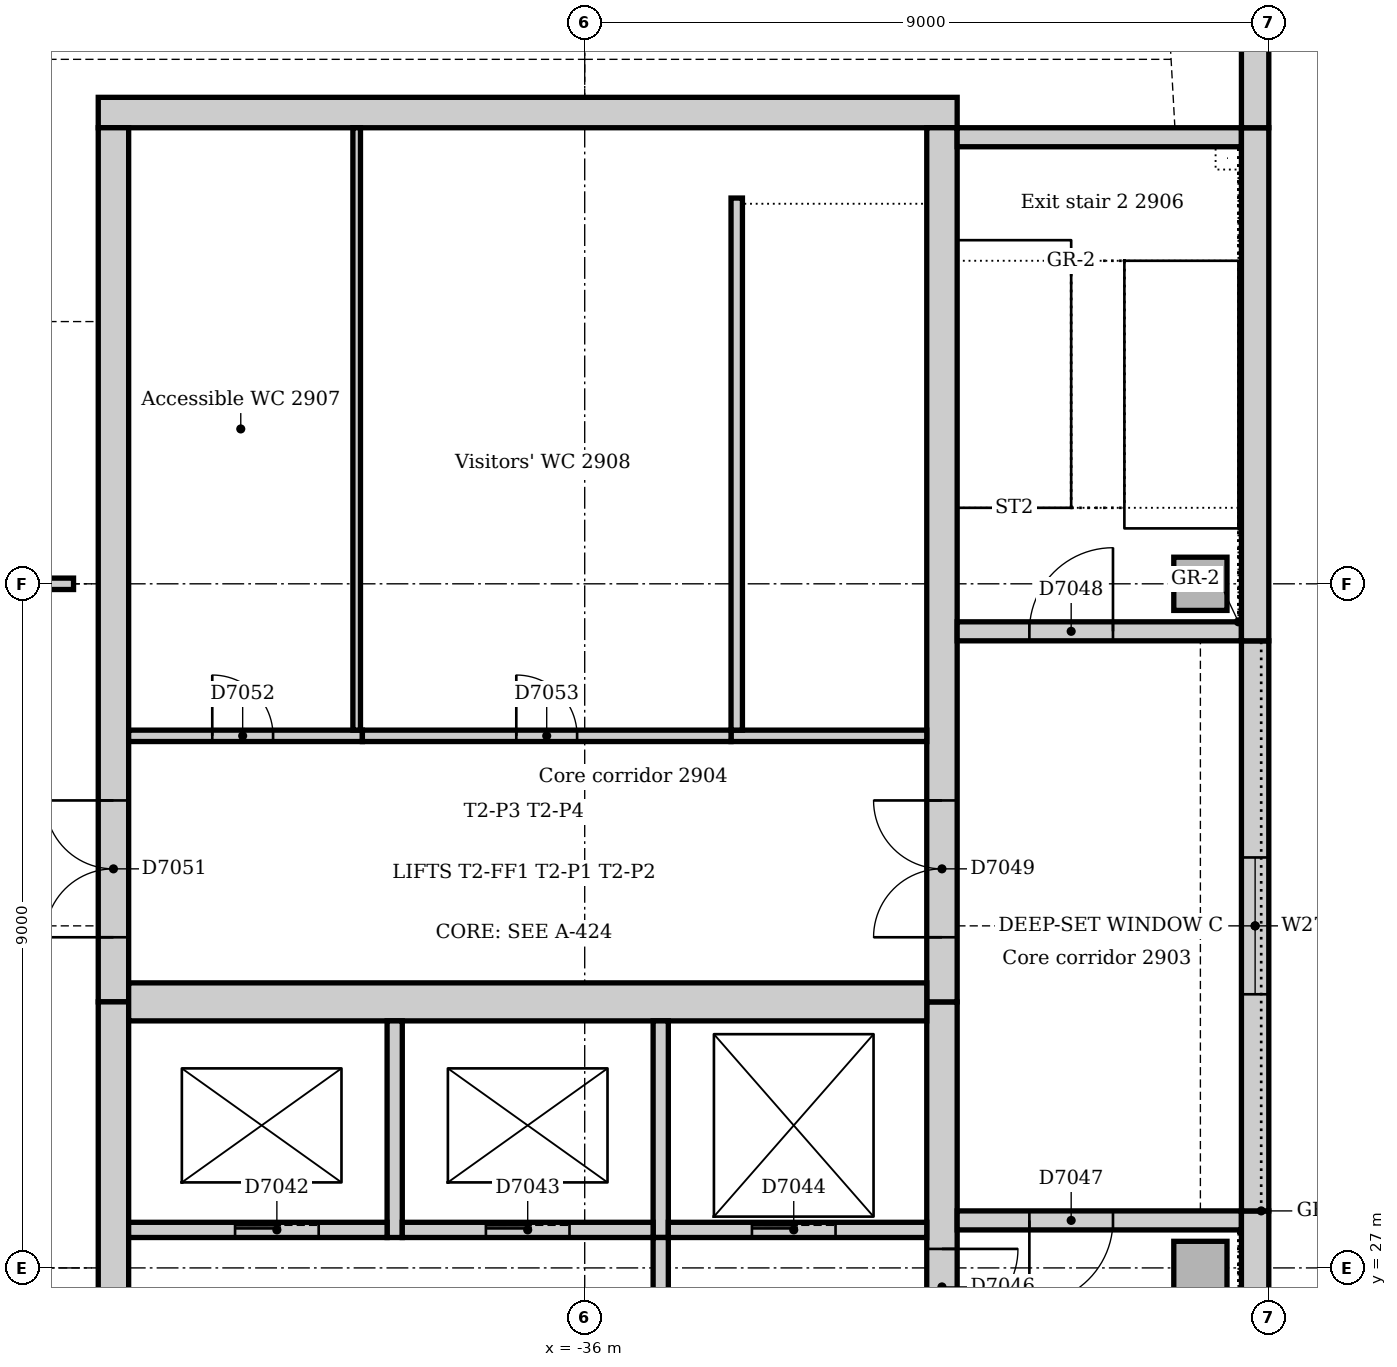
"""IFC4 building model, lengths in metres.
Left out: names, types, materials, properties, quantities, classifications, styles, units other than length and angle.
Written with IfcOpenShell. Run it as: python <this file> out.ifc"""

import sys

from ifc_helpers import new_model, si_unit, direction, frame, frame_2d, origin, origin_2d, place, context, subcontext, project, spatial, rectangle, extrude, element, fill, save


model = new_model("IFC4")
c1 = context("Model", 3, precision=1e-05, world=origin(), true_north=direction((0.0, 1.0)))
c2 = subcontext(c1, "Body", "Model", "MODEL_VIEW")
j1 = project(units=[si_unit("LENGTHUNIT", "METRE"), si_unit("PLANEANGLEUNIT", "RADIAN")], contexts=[c1])
p1 = place(None, origin())
s1 = spatial("IfcSite", under=j1, at=p1, CompositionType="ELEMENT")
p2 = place(p1, origin())
s2 = spatial("IfcBuilding", under=s1, at=p2, CompositionType="ELEMENT")
p3 = place(p2, frame((0.0, 0.0, 124.0)))
s3 = spatial("IfcBuildingStorey", under=s2, at=p3, CompositionType="ELEMENT", Elevation=124.0)
p4 = place(p3, frame((-31.1, 42.2, 0.0), z_axis=(0.0, 0.0, 1.0), x_axis=(-1.0, 0.0, 0.0)))
e1 = element("IfcWall", 1, at=p4, inside=s3, PredefinedType="SOLIDWALL", context=c2, shape_type="SweptSolid", body=[
    extrude(rectangle(XDim=11.3, YDim=0.4, at=frame_2d((5.65, 0.0))), origin(), (0.0, 0.0, 1.0), 4.0),
])
p5 = place(p3, frame((-31.3, 21.0, 0.0), z_axis=(0.0, 0.0, 1.0), x_axis=(0.0, 1.0, 0.0)))
e2 = element("IfcWall", 2, at=p5, inside=s3, PredefinedType="SOLIDWALL", context=c2, shape_type="SweptSolid", body=[
    extrude(rectangle(XDim=9.5, YDim=0.4, at=frame_2d((4.75, 0.0))), origin(), (0.0, 0.0, 1.0), 4.0),
])
p6 = place(p5, frame((5.25, 0.0, 0.0)))
e3 = element("IfcOpeningElement", 3, at=p6, cuts=e2, PredefinedType="OPENING", context=c2, shape_type="SweptSolid", body=[
    extrude(rectangle(XDim=1.0, YDim=2.1, at=frame_2d((0.5, 1.05))), frame((0.0, 0.21, 0.0), z_axis=(0.0, -1.0, 0.0), x_axis=(1.0, 0.0, 0.0)), (0.0, 0.0, 1.0), 0.42),
])
p7 = place(p3, frame((-31.3, 30.5, 0.0), z_axis=(0.0, 0.0, 1.0), x_axis=(0.0, 1.0, 0.0)))
e4 = element("IfcWall", 4, at=p7, inside=s3, PredefinedType="SOLIDWALL", context=c2, shape_type="SweptSolid", body=[
    extrude(rectangle(XDim=11.5, YDim=0.4, at=frame_2d((5.75, 0.0))), origin(), (0.0, 0.0, 1.0), 4.0),
])
p8 = place(p7, frame((0.85, 0.0, 0.0)))
e5 = element("IfcOpeningElement", 5, at=p8, cuts=e4, PredefinedType="OPENING", context=c2, shape_type="SweptSolid", body=[
    extrude(rectangle(XDim=1.8, YDim=2.1, at=frame_2d((0.9, 1.05))), frame((0.0, 0.21, 0.0), z_axis=(0.0, -1.0, 0.0), x_axis=(1.0, 0.0, 0.0)), (0.0, 0.0, 1.0), 0.42),
])
p9 = place(p3, frame((-42.2, 42.0, 0.0), z_axis=(0.0, 0.0, 1.0), x_axis=(0.0, -1.0, 0.0)))
e6 = element("IfcWall", 6, at=p9, inside=s3, PredefinedType="SOLIDWALL", context=c2, shape_type="SweptSolid", body=[
    extrude(rectangle(XDim=11.5, YDim=0.4, at=frame_2d((5.75, 0.0))), origin(), (0.0, 0.0, 1.0), 4.0),
])
p10 = place(p9, frame((8.85, 0.0, 0.0)))
e7 = element("IfcOpeningElement", 7, at=p10, cuts=e6, PredefinedType="OPENING", context=c2, shape_type="SweptSolid", body=[
    extrude(rectangle(XDim=1.8, YDim=2.1, at=frame_2d((0.9, 1.05))), frame((0.0, 0.21, 0.0), z_axis=(0.0, -1.0, 0.0), x_axis=(1.0, 0.0, 0.0)), (0.0, 0.0, 1.0), 0.42),
])
p11 = place(p3, frame((-42.2, 30.5, 0.0), z_axis=(0.0, 0.0, 1.0), x_axis=(0.0, -1.0, 0.0)))
e8 = element("IfcWall", 8, at=p11, inside=s3, PredefinedType="SOLIDWALL", context=c2, shape_type="SweptSolid", body=[
    extrude(rectangle(XDim=9.5, YDim=0.4, at=frame_2d((4.75, 0.0))), origin(), (0.0, 0.0, 1.0), 4.0),
])
p12 = place(p11, frame((3.85, 0.0, 0.0)))
e9 = element("IfcOpeningElement", 9, at=p12, cuts=e8, PredefinedType="OPENING", context=c2, shape_type="SweptSolid", body=[
    extrude(rectangle(XDim=1.8, YDim=2.1, at=frame_2d((0.9, 1.05))), frame((0.0, 0.21, 0.0), z_axis=(0.0, -1.0, 0.0), x_axis=(1.0, 0.0, 0.0)), (0.0, 0.0, 1.0), 0.42),
])
p13 = place(p3, frame((-42.0, 30.5, 0.0), z_axis=(0.0, 0.0, 1.0), x_axis=(1.0, 0.0, 0.0)))
e10 = element("IfcWall", 10, at=p13, inside=s3, PredefinedType="SOLIDWALL", context=c2, shape_type="SweptSolid", body=[
    extrude(rectangle(XDim=10.5, YDim=0.5, at=frame_2d((5.25, 0.0))), origin(), (0.0, 0.0, 1.0), 4.0),
])
p14 = place(p3, frame((-27.36, 27.625, 0.0), z_axis=(0.0, 0.0, 1.0), x_axis=(-1.0, 0.0, 0.0)))
e11 = element("IfcWall", 11, at=p14, inside=s3, PredefinedType="SOLIDWALL", context=c2, shape_type="SweptSolid", body=[
    extrude(rectangle(XDim=3.74, YDim=0.25, at=frame_2d((1.87, 0.0))), origin(), (0.0, 0.0, 1.0), 4.0),
])
p15 = place(p14, frame((1.69, 0.0, 0.0)))
e12 = element("IfcOpeningElement", 12, at=p15, cuts=e11, PredefinedType="OPENING", context=c2, shape_type="SweptSolid", body=[
    extrude(rectangle(XDim=1.1, YDim=2.1, at=frame_2d((0.55, 1.05))), frame((0.0, 0.135, 0.0), z_axis=(0.0, -1.0, 0.0), x_axis=(1.0, 0.0, 0.0)), (0.0, 0.0, 1.0), 0.27),
])
p16 = place(p3, frame((-31.1, 35.375, 0.0), z_axis=(0.0, 0.0, 1.0), x_axis=(1.0, 0.0, 0.0)))
e13 = element("IfcWall", 13, at=p16, inside=s3, PredefinedType="SOLIDWALL", context=c2, shape_type="SweptSolid", body=[
    extrude(rectangle(XDim=3.74, YDim=0.25, at=frame_2d((1.87, 0.0))), origin(), (0.0, 0.0, 1.0), 4.0),
])
p17 = place(p16, frame((0.95, 0.0, 0.0)))
e14 = element("IfcOpeningElement", 14, at=p17, cuts=e13, PredefinedType="OPENING", context=c2, shape_type="SweptSolid", body=[
    extrude(rectangle(XDim=1.1, YDim=2.1, at=frame_2d((0.55, 1.05))), frame((0.0, 0.135, 0.0), z_axis=(0.0, -1.0, 0.0), x_axis=(1.0, 0.0, 0.0)), (0.0, 0.0, 1.0), 0.27),
])
p18 = place(p3, frame((-27.36, 41.875, 0.0), z_axis=(0.0, 0.0, 1.0), x_axis=(-1.0, 0.0, 0.0)))
e15 = element("IfcWall", 15, at=p18, inside=s3, PredefinedType="SOLIDWALL", context=c2, shape_type="SweptSolid", body=[
    extrude(rectangle(XDim=3.74, YDim=0.25, at=frame_2d((1.87, 0.0))), origin(), (0.0, 0.0, 1.0), 4.0),
])
for number, where, z_axis, x_axis in (
    (16, (-27.9, 27.0, 0.0), (0.0, 0.0, 1.0), (1.0, 0.0, 0.0)),
    (17, (-27.9, 36.0, 0.0), (0.0, 0.0, 1.0), (1.0, 0.0, 0.0)),
):
    element("IfcColumn", number, at=place(p3, frame(where, z_axis=z_axis, x_axis=x_axis)), inside=s3, PredefinedType="COLUMN", context=c2, shape_type="SweptSolid", body=[
        extrude(rectangle(XDim=0.7, YDim=0.7, at=origin_2d()), origin(), (0.0, 0.0, 1.0), 4.0),
    ])
p19 = place(p3, frame((-27.18, 21.0, 0.0), z_axis=(0.0, 0.0, 1.0), x_axis=(0.0, 1.0, 0.0)))
e18 = element("IfcWall", 18, at=p19, inside=s3, PredefinedType="STANDARD", context=c2, shape_type="SweptSolid", body=[
    extrude(rectangle(XDim=6.75, YDim=0.36, at=frame_2d((3.375, 0.0))), origin(), (0.0, 0.0, 1.0), 3.85),
])
p20 = place(p3, frame((-27.18, 27.75, 0.0), z_axis=(0.0, 0.0, 1.0), x_axis=(0.0, 1.0, 0.0)))
e19 = element("IfcWall", 19, at=p20, inside=s3, PredefinedType="STANDARD", context=c2, shape_type="SweptSolid", body=[
    extrude(rectangle(XDim=7.5, YDim=0.36, at=frame_2d((3.75, 0.0))), origin(), (0.0, 0.0, 1.0), 3.85),
])
p21 = place(p20, frame((2.85, 0.0, 1.2)))
e20 = element("IfcOpeningElement", 20, at=p21, cuts=e19, PredefinedType="OPENING", context=c2, shape_type="SweptSolid", body=[
    extrude(rectangle(XDim=1.8, YDim=1.2, at=frame_2d((0.9, 0.6))), frame((0.0, 0.19, 0.0), z_axis=(0.0, -1.0, 0.0), x_axis=(1.0, 0.0, 0.0)), (0.0, 0.0, 1.0), 0.38),
])
p22 = place(p3, frame((-27.18, 35.25, 0.0), z_axis=(0.0, 0.0, 1.0), x_axis=(0.0, 1.0, 0.0)))
e21 = element("IfcWall", 21, at=p22, inside=s3, PredefinedType="STANDARD", context=c2, shape_type="SweptSolid", body=[
    extrude(rectangle(XDim=6.75, YDim=0.36, at=frame_2d((3.375, 0.0))), origin(), (0.0, 0.0, 1.0), 3.85),
])
p23 = place(p3, frame((-27.18, 42.0, 0.0), z_axis=(0.0, 0.0, 1.0), x_axis=(0.0, 1.0, 0.0)))
e22 = element("IfcWall", 22, at=p23, inside=s3, PredefinedType="STANDARD", context=c2, shape_type="SweptSolid", body=[
    extrude(rectangle(XDim=3.257, YDim=0.36, at=frame_2d((1.629, 0.0))), origin(), (0.0, 0.0, 1.0), 3.85),
])
p24 = place(p3, frame((-38.5, 27.4, 0.0), z_axis=(0.0, 0.0, 1.0), x_axis=(0.0, 1.0, 0.0)))
e23 = element("IfcWall", 23, at=p24, inside=s3, PredefinedType="SOLIDWALL", context=c2, shape_type="SweptSolid", body=[
    extrude(rectangle(XDim=2.85, YDim=0.2, at=frame_2d((1.425, 0.0))), origin(), (0.0, 0.0, 1.0), 4.0),
])
p25 = place(p3, frame((-42.0, 27.5, 0.0), z_axis=(0.0, 0.0, 1.0), x_axis=(1.0, 0.0, 0.0)))
e24 = element("IfcWall", 24, at=p25, inside=s3, PredefinedType="SOLIDWALL", context=c2, shape_type="SweptSolid", body=[
    extrude(rectangle(XDim=3.4, YDim=0.2, at=frame_2d((1.7, 0.0))), origin(), (0.0, 0.0, 1.0), 4.0),
])
p26 = place(p25, frame((1.4, 0.0, 0.0)))
e25 = element("IfcOpeningElement", 25, at=p26, cuts=e24, PredefinedType="OPENING", context=c2, shape_type="SweptSolid", body=[
    extrude(rectangle(XDim=1.1, YDim=2.1, at=frame_2d((0.55, 1.05))), frame((0.0, 0.11, 0.0), z_axis=(0.0, -1.0, 0.0), x_axis=(1.0, 0.0, 0.0)), (0.0, 0.0, 1.0), 0.22),
])
p27 = place(p3, frame((-35.0, 27.4, 0.0), z_axis=(0.0, 0.0, 1.0), x_axis=(0.0, 1.0, 0.0)))
e26 = element("IfcWall", 26, at=p27, inside=s3, PredefinedType="SOLIDWALL", context=c2, shape_type="SweptSolid", body=[
    extrude(rectangle(XDim=2.85, YDim=0.2, at=frame_2d((1.425, 0.0))), origin(), (0.0, 0.0, 1.0), 4.0),
])
p28 = place(p3, frame((-38.4, 27.5, 0.0), z_axis=(0.0, 0.0, 1.0), x_axis=(1.0, 0.0, 0.0)))
e27 = element("IfcWall", 27, at=p28, inside=s3, PredefinedType="SOLIDWALL", context=c2, shape_type="SweptSolid", body=[
    extrude(rectangle(XDim=3.3, YDim=0.2, at=frame_2d((1.65, 0.0))), origin(), (0.0, 0.0, 1.0), 4.0),
])
p29 = place(p28, frame((1.1, 0.0, 0.0)))
e28 = element("IfcOpeningElement", 28, at=p29, cuts=e27, PredefinedType="OPENING", context=c2, shape_type="SweptSolid", body=[
    extrude(rectangle(XDim=1.1, YDim=2.1, at=frame_2d((0.55, 1.05))), frame((0.0, 0.11, 0.0), z_axis=(0.0, -1.0, 0.0), x_axis=(1.0, 0.0, 0.0)), (0.0, 0.0, 1.0), 0.22),
])
p30 = place(p3, frame((-34.9, 27.5, 0.0), z_axis=(0.0, 0.0, 1.0), x_axis=(1.0, 0.0, 0.0)))
e29 = element("IfcWall", 29, at=p30, inside=s3, PredefinedType="SOLIDWALL", context=c2, shape_type="SweptSolid", body=[
    extrude(rectangle(XDim=3.4, YDim=0.2, at=frame_2d((1.7, 0.0))), origin(), (0.0, 0.0, 1.0), 4.0),
])
p31 = place(p30, frame((1.1, 0.0, 0.0)))
e30 = element("IfcOpeningElement", 30, at=p31, cuts=e29, PredefinedType="OPENING", context=c2, shape_type="SweptSolid", body=[
    extrude(rectangle(XDim=1.1, YDim=2.1, at=frame_2d((0.55, 1.05))), frame((0.0, 0.11, 0.0), z_axis=(0.0, -1.0, 0.0), x_axis=(1.0, 0.0, 0.0)), (0.0, 0.0, 1.0), 0.22),
])
p32 = place(p3, frame((-35.0, 24.1, 0.0), z_axis=(0.0, 0.0, 1.0), x_axis=(0.0, 1.0, 0.0)))
e31 = element("IfcWall", 31, at=p32, inside=s3, PredefinedType="SOLIDWALL", context=c2, shape_type="SweptSolid", body=[
    extrude(rectangle(XDim=3.3, YDim=0.2, at=frame_2d((1.65, 0.0))), origin(), (0.0, 0.0, 1.0), 4.0),
])
p33 = place(p32, frame((1.15, 0.0, 0.0)))
e32 = element("IfcOpeningElement", 32, at=p33, cuts=e31, PredefinedType="OPENING", context=c2, shape_type="SweptSolid", body=[
    extrude(rectangle(XDim=1.0, YDim=2.1, at=frame_2d((0.5, 1.05))), frame((0.0, 0.11, 0.0), z_axis=(0.0, -1.0, 0.0), x_axis=(1.0, 0.0, 0.0)), (0.0, 0.0, 1.0), 0.22),
])
p34 = place(p3, frame((-34.075, 34.0, 0.0), z_axis=(0.0, 0.0, 1.0), x_axis=(1.0, 0.0, 0.0)))
e33 = element("IfcWall", 33, at=p34, inside=s3, PredefinedType="SOLIDWALL", context=c2, shape_type="SweptSolid", body=[
    extrude(rectangle(XDim=2.575, YDim=0.15, at=frame_2d((1.288, 0.0))), origin(), (0.0, 0.0, 1.0), 4.0),
])
p35 = place(p3, frame((-34.0, 41.075, 0.0), z_axis=(0.0, 0.0, 1.0), x_axis=(0.0, -1.0, 0.0)))
e34 = element("IfcWall", 34, at=p35, inside=s3, PredefinedType="SOLIDWALL", context=c2, shape_type="SweptSolid", body=[
    extrude(rectangle(XDim=7.0, YDim=0.15, at=frame_2d((3.5, 0.0))), origin(), (0.0, 0.0, 1.0), 4.0),
])
p36 = place(p3, frame((-38.925, 34.0, 0.0), z_axis=(0.0, 0.0, 1.0), x_axis=(-1.0, 0.0, 0.0)))
e35 = element("IfcWall", 35, at=p36, inside=s3, PredefinedType="PARTITIONING", context=c2, shape_type="SweptSolid", body=[
    extrude(rectangle(XDim=3.075, YDim=0.15, at=frame_2d((1.538, 0.0))), origin(), (0.0, 0.0, 1.0), 3.85),
])
p37 = place(p36, frame((1.175, 0.0, 0.0)))
e36 = element("IfcOpeningElement", 36, at=p37, cuts=e35, PredefinedType="OPENING", context=c2, shape_type="SweptSolid", body=[
    extrude(rectangle(XDim=0.8, YDim=2.1, at=frame_2d((0.4, 1.05))), frame((0.0, 0.085, 0.0), z_axis=(0.0, -1.0, 0.0), x_axis=(1.0, 0.0, 0.0)), (0.0, 0.0, 1.0), 0.17),
])
p38 = place(p3, frame((-34.075, 34.0, 0.0), z_axis=(0.0, 0.0, 1.0), x_axis=(-1.0, 0.0, 0.0)))
e37 = element("IfcWall", 37, at=p38, inside=s3, PredefinedType="PARTITIONING", context=c2, shape_type="SweptSolid", body=[
    extrude(rectangle(XDim=4.85, YDim=0.15, at=frame_2d((2.425, 0.0))), origin(), (0.0, 0.0, 1.0), 3.85),
])
p39 = place(p38, frame((2.025, 0.0, 0.0)))
e38 = element("IfcOpeningElement", 38, at=p39, cuts=e37, PredefinedType="OPENING", context=c2, shape_type="SweptSolid", body=[
    extrude(rectangle(XDim=0.8, YDim=2.1, at=frame_2d((0.4, 1.05))), frame((0.0, 0.085, 0.0), z_axis=(0.0, -1.0, 0.0), x_axis=(1.0, 0.0, 0.0)), (0.0, 0.0, 1.0), 0.17),
])
p40 = place(p3, frame((-39.0, 34.075, 0.0), z_axis=(0.0, 0.0, 1.0), x_axis=(0.0, 1.0, 0.0)))
e39 = element("IfcWall", 39, at=p40, inside=s3, PredefinedType="PARTITIONING", context=c2, shape_type="SweptSolid", body=[
    extrude(rectangle(XDim=7.925, YDim=0.1, at=frame_2d((3.962, 0.0))), origin(), (0.0, 0.0, 1.0), 3.85),
])
p41 = place(p3, frame((-44.7, 36.0, 0.0), z_axis=(0.0, 0.0, 1.0), x_axis=(1.0, 0.0, 0.0)))
e40 = element("IfcWall", 40, at=p41, inside=s3, PredefinedType="PARTITIONING", context=c2, shape_type="SweptSolid", body=[
    extrude(rectangle(XDim=1.975, YDim=0.15, at=frame_2d((0.988, 0.0))), origin(), (0.0, 0.0, 1.0), 3.602),
])
p42 = place(p41, frame((0.55, 0.0, 0.0)))
e41 = element("IfcOpeningElement", 41, at=p42, cuts=e40, PredefinedType="OPENING", context=c2, shape_type="SweptSolid", body=[
    extrude(rectangle(XDim=0.9, YDim=2.1, at=frame_2d((0.45, 1.05))), frame((0.0, 0.085, 0.0), z_axis=(0.0, -1.0, 0.0), x_axis=(1.0, 0.0, 0.0)), (0.0, 0.0, 1.0), 0.17),
])
p43 = place(p21, origin())
e42 = element("IfcWindow", 42, at=p43, inside=s3, PartitioningType="SINGLE_PANEL", PredefinedType="WINDOW", context=c2, shape_type="SweptSolid", body=[
    extrude(rectangle(XDim=1.8, YDim=1.2, at=frame_2d((0.9, 0.6))), frame((0.0, 0.13, 0.0), z_axis=(0.0, -1.0, 0.0), x_axis=(1.0, 0.0, 0.0)), (0.0, 0.0, 1.0), 0.06),
])
fill(e20, e42)
p44 = place(p26, origin())
e43 = element("IfcDoor", 43, at=p44, inside=s3, OperationType="SLIDING_TO_LEFT", PredefinedType="DOOR", context=c2, shape_type="SweptSolid", body=[
    extrude(rectangle(XDim=1.1, YDim=2.1, at=frame_2d((0.55, 1.05))), frame((0.0, 0.025, 0.0), z_axis=(0.0, -1.0, 0.0), x_axis=(1.0, 0.0, 0.0)), (0.0, 0.0, 1.0), 0.05),
])
fill(e25, e43)
p45 = place(p29, origin())
e44 = element("IfcDoor", 44, at=p45, inside=s3, OperationType="SLIDING_TO_LEFT", PredefinedType="DOOR", context=c2, shape_type="SweptSolid", body=[
    extrude(rectangle(XDim=1.1, YDim=2.1, at=frame_2d((0.55, 1.05))), frame((0.0, 0.025, 0.0), z_axis=(0.0, -1.0, 0.0), x_axis=(1.0, 0.0, 0.0)), (0.0, 0.0, 1.0), 0.05),
])
fill(e28, e44)
p46 = place(p31, origin())
e45 = element("IfcDoor", 45, at=p46, inside=s3, OperationType="SLIDING_TO_LEFT", PredefinedType="DOOR", context=c2, shape_type="SweptSolid", body=[
    extrude(rectangle(XDim=1.1, YDim=2.1, at=frame_2d((0.55, 1.05))), frame((0.0, 0.025, 0.0), z_axis=(0.0, -1.0, 0.0), x_axis=(1.0, 0.0, 0.0)), (0.0, 0.0, 1.0), 0.05),
])
fill(e30, e45)
p47 = place(p6, frame((1.0, 0.0, 0.0), z_axis=(0.0, 0.0, 1.0), x_axis=(-1.0, 0.0, 0.0)))
e46 = element("IfcDoor", 46, at=p47, inside=s3, OperationType="SINGLE_SWING_LEFT", PredefinedType="DOOR", context=c2, shape_type="SweptSolid", body=[
    extrude(rectangle(XDim=1.0, YDim=2.1, at=frame_2d((0.5, 1.05))), frame((0.0, 0.025, 0.0), z_axis=(0.0, -1.0, 0.0), x_axis=(1.0, 0.0, 0.0)), (0.0, 0.0, 1.0), 0.05),
])
fill(e3, e46)
p48 = place(p15, origin())
e47 = element("IfcDoor", 47, at=p48, inside=s3, OperationType="SINGLE_SWING_RIGHT", PredefinedType="DOOR", context=c2, shape_type="SweptSolid", body=[
    extrude(rectangle(XDim=1.1, YDim=2.1, at=frame_2d((0.55, 1.05))), frame((0.0, 0.025, 0.0), z_axis=(0.0, -1.0, 0.0), x_axis=(1.0, 0.0, 0.0)), (0.0, 0.0, 1.0), 0.05),
])
fill(e12, e47)
p49 = place(p17, origin())
e48 = element("IfcDoor", 48, at=p49, inside=s3, OperationType="SINGLE_SWING_RIGHT", PredefinedType="DOOR", context=c2, shape_type="SweptSolid", body=[
    extrude(rectangle(XDim=1.1, YDim=2.1, at=frame_2d((0.55, 1.05))), frame((0.0, 0.025, 0.0), z_axis=(0.0, -1.0, 0.0), x_axis=(1.0, 0.0, 0.0)), (0.0, 0.0, 1.0), 0.05),
])
fill(e14, e48)
p50 = place(p8, origin())
e49 = element("IfcDoor", 49, at=p50, inside=s3, OperationType="DOUBLE_DOOR_SINGLE_SWING", PredefinedType="DOOR", context=c2, shape_type="SweptSolid", body=[
    extrude(rectangle(XDim=1.8, YDim=2.1, at=frame_2d((0.9, 1.05))), frame((0.0, 0.025, 0.0), z_axis=(0.0, -1.0, 0.0), x_axis=(1.0, 0.0, 0.0)), (0.0, 0.0, 1.0), 0.05),
])
fill(e5, e49)
p51 = place(p10, frame((1.8, 0.0, 0.0), z_axis=(0.0, 0.0, 1.0), x_axis=(-1.0, 0.0, 0.0)))
e50 = element("IfcDoor", 50, at=p51, inside=s3, OperationType="DOUBLE_DOOR_SINGLE_SWING", PredefinedType="DOOR", context=c2, shape_type="SweptSolid", body=[
    extrude(rectangle(XDim=1.8, YDim=2.1, at=frame_2d((0.9, 1.05))), frame((0.0, 0.025, 0.0), z_axis=(0.0, -1.0, 0.0), x_axis=(1.0, 0.0, 0.0)), (0.0, 0.0, 1.0), 0.05),
])
fill(e7, e50)
p52 = place(p37, frame((0.8, 0.0, 0.0), z_axis=(0.0, 0.0, 1.0), x_axis=(-1.0, 0.0, 0.0)))
e51 = element("IfcDoor", 51, at=p52, inside=s3, OperationType="SINGLE_SWING_LEFT", PredefinedType="DOOR", context=c2, shape_type="SweptSolid", body=[
    extrude(rectangle(XDim=0.8, YDim=2.1, at=frame_2d((0.4, 1.05))), frame((0.0, 0.025, 0.0), z_axis=(0.0, -1.0, 0.0), x_axis=(1.0, 0.0, 0.0)), (0.0, 0.0, 1.0), 0.05),
])
fill(e36, e51)
p53 = place(p39, frame((0.8, 0.0, 0.0), z_axis=(0.0, 0.0, 1.0), x_axis=(-1.0, 0.0, 0.0)))
e52 = element("IfcDoor", 52, at=p53, inside=s3, OperationType="SINGLE_SWING_LEFT", PredefinedType="DOOR", context=c2, shape_type="SweptSolid", body=[
    extrude(rectangle(XDim=0.8, YDim=2.1, at=frame_2d((0.4, 1.05))), frame((0.0, 0.025, 0.0), z_axis=(0.0, -1.0, 0.0), x_axis=(1.0, 0.0, 0.0)), (0.0, 0.0, 1.0), 0.05),
])
fill(e38, e52)
save(model, sys.argv[1])
